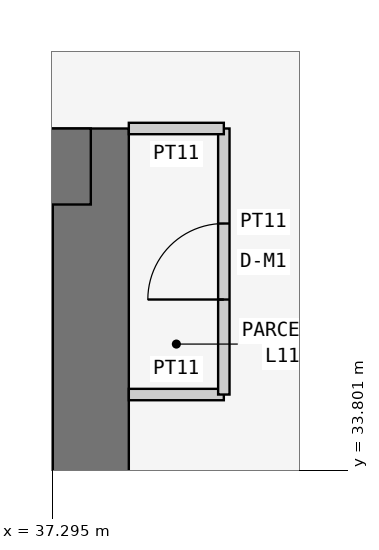
"""IFC4 building model, lengths in metres.
Left out: names, types, materials, properties, quantities, classifications, styles, units other than length and angle.
Written with IfcOpenShell. Run it as: python <this file> out.ifc"""

import sys

from ifc_helpers import new_model, si_unit, direction, frame, frame_2d, origin, place, context, subcontext, project, spatial, rectangle, extrude, element, fill, save


model = new_model("IFC4")
c1 = context("Model", 3, precision=1e-05, world=origin(), true_north=direction((0.0, 1.0)))
c2 = subcontext(c1, "Body", "Model", "MODEL_VIEW")
j1 = project(units=[si_unit("LENGTHUNIT", "METRE"), si_unit("PLANEANGLEUNIT", "RADIAN")], contexts=[c1])
p1 = place(None, origin())
s1 = spatial("IfcSite", under=j1, at=p1, CompositionType="ELEMENT")
p2 = place(p1, origin())
s2 = spatial("IfcBuilding", under=s1, at=p2, CompositionType="ELEMENT")
p3 = place(p2, frame((0.0, 0.0, 48.9)))
s3 = spatial("IfcBuildingStorey", under=s2, at=p3, CompositionType="ELEMENT", Elevation=48.9)
p4 = place(p3, frame((37.8, 21.0, 0.0), z_axis=(0.0, 0.0, 1.0), x_axis=(0.0, 1.0, 0.0)))
e1 = element("IfcWall", 1, at=p4, inside=s3, PredefinedType="SHEAR", context=c2, shape_type="SweptSolid", body=[
    extrude(rectangle(XDim=17.3, YDim=1.0, at=frame_2d((8.65, 0.0))), origin(), (0.0, 0.0, 1.0), 3.6),
])
p5 = place(p4, frame((5.2, 0.0, 0.0)))
e2 = element("IfcOpeningElement", 2, at=p5, cuts=e1, PredefinedType="OPENING", context=c2, shape_type="SweptSolid", body=[
    extrude(rectangle(XDim=1.2, YDim=2.1, at=frame_2d((0.6, 1.05))), frame((0.0, 0.51, 0.0), z_axis=(0.0, -1.0, 0.0), x_axis=(1.0, 0.0, 0.0)), (0.0, 0.0, 1.0), 1.02),
])
p6 = place(p3, frame((37.8, 37.8, 0.0), z_axis=(0.0, 0.0, 1.0), x_axis=(-1.0, 0.0, 0.0)))
e3 = element("IfcWall", 3, at=p6, inside=s3, PredefinedType="SHEAR", context=c2, shape_type="SweptSolid", body=[
    extrude(rectangle(XDim=17.3, YDim=1.0, at=frame_2d((8.65, 0.0))), origin(), (0.0, 0.0, 1.0), 3.6),
])
p7 = place(p3, frame((38.3, 34.8, 0.0), z_axis=(0.0, 0.0, 1.0), x_axis=(1.0, 0.0, 0.0)))
e4 = element("IfcWall", 4, at=p7, inside=s3, PredefinedType="PARTITIONING", context=c2, shape_type="SweptSolid", body=[
    extrude(rectangle(XDim=1.25, YDim=0.15, at=frame_2d((0.625, 0.0))), origin(), (0.0, 0.0, 1.0), 3.45),
])
p8 = place(p3, frame((39.55, 34.8, 0.0), z_axis=(0.0, 0.0, 1.0), x_axis=(0.0, 1.0, 0.0)))
e5 = element("IfcWall", 5, at=p8, inside=s3, PredefinedType="PARTITIONING", context=c2, shape_type="SweptSolid", body=[
    extrude(rectangle(XDim=3.5, YDim=0.15, at=frame_2d((1.75, 0.0))), origin(), (0.0, 0.0, 1.0), 3.45),
])
p9 = place(p8, frame((1.25, 0.0, 0.0)))
e6 = element("IfcOpeningElement", 6, at=p9, cuts=e5, PredefinedType="OPENING", context=c2, shape_type="SweptSolid", body=[
    extrude(rectangle(XDim=1.0, YDim=2.1, at=frame_2d((0.5, 1.05))), frame((0.0, 0.085, 0.0), z_axis=(0.0, -1.0, 0.0), x_axis=(1.0, 0.0, 0.0)), (0.0, 0.0, 1.0), 0.17),
])
p10 = place(p3, frame((39.55, 38.3, 0.0), z_axis=(0.0, 0.0, 1.0), x_axis=(-1.0, 0.0, 0.0)))
e7 = element("IfcWall", 7, at=p10, inside=s3, PredefinedType="PARTITIONING", context=c2, shape_type="SweptSolid", body=[
    extrude(rectangle(XDim=1.25, YDim=0.15, at=frame_2d((0.625, 0.0))), origin(), (0.0, 0.0, 1.0), 3.45),
])
p11 = place(p9, origin())
e8 = element("IfcDoor", 8, at=p11, inside=s3, OperationType="SINGLE_SWING_LEFT", PredefinedType="DOOR", context=c2, shape_type="SweptSolid", body=[
    extrude(rectangle(XDim=1.0, YDim=2.1, at=frame_2d((0.5, 1.05))), frame((0.0, 0.025, 0.0), z_axis=(0.0, -1.0, 0.0), x_axis=(1.0, 0.0, 0.0)), (0.0, 0.0, 1.0), 0.05),
])
fill(e6, e8)
save(model, sys.argv[1])
